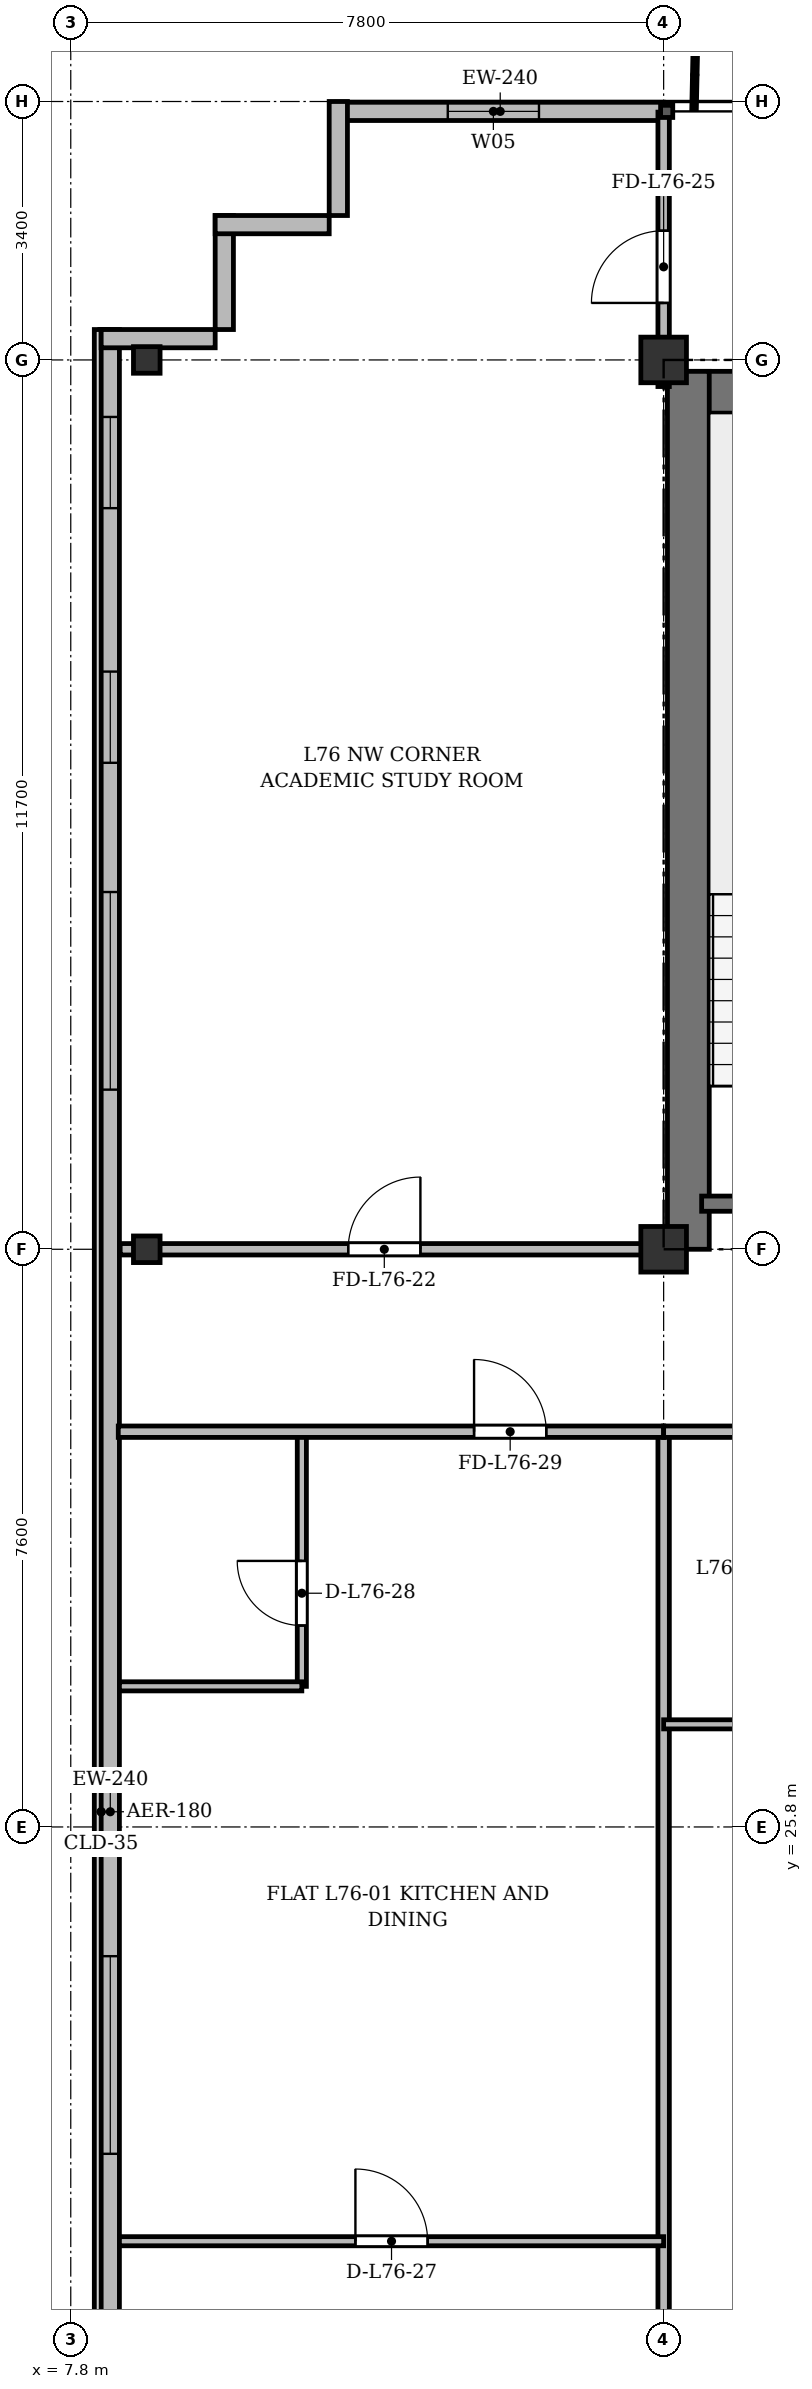
"""IFC4 building model, lengths in metres.
Left out: names, types, materials, properties, quantities, classifications, styles, units other than length and angle.
Written with IfcOpenShell. Run it as: python <this file> out.ifc"""

import sys

from ifc_helpers import new_model, si_unit, direction, frame, frame_2d, origin, origin_2d, place, context, subcontext, project, spatial, rectangle, i_section, extrude, source, transform, mapped, element, fill, save


model = new_model("IFC4")
c1 = context("Model", 3, precision=1e-05, world=origin(), true_north=direction((0.0, 1.0)))
c2 = subcontext(c1, "Body", "Model", "MODEL_VIEW")
j1 = project(units=[si_unit("LENGTHUNIT", "METRE"), si_unit("PLANEANGLEUNIT", "RADIAN")], contexts=[c1])
p1 = place(None, origin())
s1 = spatial("IfcSite", under=j1, at=p1, CompositionType="ELEMENT")
p2 = place(p1, origin())
s2 = spatial("IfcBuilding", under=s1, at=p2, CompositionType="ELEMENT")
p3 = place(p2, frame((0.0, 0.0, 291.9)))
s3 = spatial("IfcBuildingStorey", under=s2, at=p3, CompositionType="ELEMENT", Elevation=291.9)
m1 = source(origin(), c2, "Body", "SweptSolid", [
    extrude(i_section(OverallWidth=0.35, OverallDepth=0.35, WebThickness=0.018, FlangeThickness=0.028, at=origin_2d()), origin(), (0.0, 0.0, 1.0), 3.6),
])
for number, where, z_axis, x_axis in (
    (1, (8.8, 33.4, 0.0), (0.0, 0.0, 1.0), (1.0, 0.0, 0.0)),
    (2, (8.8, 45.1, 0.0), (0.0, 0.0, 1.0), (1.0, 0.0, 0.0)),
):
    element("IfcColumn", number, at=place(p3, frame(where, z_axis=z_axis, x_axis=x_axis)), inside=s3, PredefinedType="COLUMN", context=c2, shape_type="MappedRepresentation", body=[
        mapped(m1, transform((0.0, 0.0, 0.0), x_axis=(1.0, 0.0, 0.0), y_axis=(0.0, 1.0, 0.0), z_axis=(0.0, 0.0, 1.0), scale=1.0)),
    ])
m2 = source(origin(), c2, "Body", "SweptSolid", [
    extrude(rectangle(XDim=0.6, YDim=0.6, at=origin_2d()), origin(), (0.0, 0.0, 1.0), 3.6),
])
for number, where, z_axis, x_axis in (
    (3, (15.6, 33.4, 0.0), (0.0, 0.0, 1.0), (1.0, 0.0, 0.0)),
    (4, (15.6, 45.1, 0.0), (0.0, 0.0, 1.0), (1.0, 0.0, 0.0)),
):
    element("IfcColumn", number, at=place(p3, frame(where, z_axis=z_axis, x_axis=x_axis)), inside=s3, PredefinedType="COLUMN", context=c2, shape_type="MappedRepresentation", body=[
        mapped(m2, transform((0.0, 0.0, 0.0), x_axis=(1.0, 0.0, 0.0), y_axis=(0.0, 1.0, 0.0), z_axis=(0.0, 0.0, 1.0), scale=1.0)),
    ])
p4 = place(p3, frame((11.3, 48.37, 0.0), z_axis=(0.0, 0.0, 1.0), x_axis=(1.0, 0.0, 0.0)))
e5 = element("IfcWall", 5, at=p4, inside=s3, PredefinedType="SOLIDWALL", context=c2, shape_type="SweptSolid", body=[
    extrude(rectangle(XDim=4.3, YDim=0.24, at=frame_2d((2.15, 0.0))), origin(), (0.0, 0.0, 1.0), 3.18),
])
p5 = place(p4, frame((1.46, 0.0, 0.9)))
e6 = element("IfcOpeningElement", 6, at=p5, cuts=e5, PredefinedType="OPENING", context=c2, shape_type="SweptSolid", body=[
    extrude(rectangle(XDim=1.2, YDim=1.65, at=frame_2d((0.6, 0.825))), frame((0.0, 0.13, 0.0), z_axis=(0.0, -1.0, 0.0), x_axis=(1.0, 0.0, 0.0)), (0.0, 0.0, 1.0), 0.26),
])
p6 = place(p3, frame((8.32, 6.5, 0.0), z_axis=(0.0, 0.0, 1.0), x_axis=(0.0, 1.0, 0.0)))
e7 = element("IfcWall", 7, at=p6, inside=s3, PredefinedType="SOLIDWALL", context=c2, shape_type="SweptSolid", body=[
    extrude(rectangle(XDim=39.0, YDim=0.24, at=frame_2d((19.5, 0.0))), origin(), (0.0, 0.0, 1.0), 3.18),
])
p7 = place(p6, frame((1.45, 0.0, 0.92)))
e8 = element("IfcOpeningElement", 8, at=p7, cuts=e7, PredefinedType="OPENING", context=c2, shape_type="SweptSolid", body=[
    extrude(rectangle(XDim=1.2, YDim=1.65, at=frame_2d((0.6, 0.825))), frame((0.0, 0.13, 0.0), z_axis=(0.0, -1.0, 0.0), x_axis=(1.0, 0.0, 0.0)), (0.0, 0.0, 1.0), 0.26),
])
p8 = place(p6, frame((3.6, 0.0, 0.92)))
e9 = element("IfcOpeningElement", 9, at=p8, cuts=e7, PredefinedType="OPENING", context=c2, shape_type="SweptSolid", body=[
    extrude(rectangle(XDim=2.6, YDim=1.9, at=frame_2d((1.3, 0.95))), frame((0.0, 0.13, 0.0), z_axis=(0.0, -1.0, 0.0), x_axis=(1.0, 0.0, 0.0)), (0.0, 0.0, 1.0), 0.26),
])
p9 = place(p6, frame((7.8, 0.0, 0.92)))
e10 = element("IfcOpeningElement", 10, at=p9, cuts=e7, PredefinedType="OPENING", context=c2, shape_type="SweptSolid", body=[
    extrude(rectangle(XDim=2.6, YDim=1.9, at=frame_2d((1.3, 0.95))), frame((0.0, 0.13, 0.0), z_axis=(0.0, -1.0, 0.0), x_axis=(1.0, 0.0, 0.0)), (0.0, 0.0, 1.0), 0.26),
])
p10 = place(p6, frame((15.0, 0.0, 0.92)))
e11 = element("IfcOpeningElement", 11, at=p10, cuts=e7, PredefinedType="OPENING", context=c2, shape_type="SweptSolid", body=[
    extrude(rectangle(XDim=2.6, YDim=1.9, at=frame_2d((1.3, 0.95))), frame((0.0, 0.13, 0.0), z_axis=(0.0, -1.0, 0.0), x_axis=(1.0, 0.0, 0.0)), (0.0, 0.0, 1.0), 0.26),
])
p11 = place(p6, frame((29.0, 0.0, 0.92)))
e12 = element("IfcOpeningElement", 12, at=p11, cuts=e7, PredefinedType="OPENING", context=c2, shape_type="SweptSolid", body=[
    extrude(rectangle(XDim=2.6, YDim=1.9, at=frame_2d((1.3, 0.95))), frame((0.0, 0.13, 0.0), z_axis=(0.0, -1.0, 0.0), x_axis=(1.0, 0.0, 0.0)), (0.0, 0.0, 1.0), 0.26),
])
p12 = place(p6, frame((33.3, 0.0, 0.92)))
e13 = element("IfcOpeningElement", 13, at=p12, cuts=e7, PredefinedType="OPENING", context=c2, shape_type="SweptSolid", body=[
    extrude(rectangle(XDim=1.2, YDim=1.65, at=frame_2d((0.6, 0.825))), frame((0.0, 0.13, 0.0), z_axis=(0.0, -1.0, 0.0), x_axis=(1.0, 0.0, 0.0)), (0.0, 0.0, 1.0), 0.26),
])
p13 = place(p6, frame((36.65, 0.0, 0.92)))
e14 = element("IfcOpeningElement", 14, at=p13, cuts=e7, PredefinedType="OPENING", context=c2, shape_type="SweptSolid", body=[
    extrude(rectangle(XDim=1.2, YDim=1.65, at=frame_2d((0.6, 0.825))), frame((0.0, 0.13, 0.0), z_axis=(0.0, -1.0, 0.0), x_axis=(1.0, 0.0, 0.0)), (0.0, 0.0, 1.0), 0.26),
])
for number, where, z_axis, x_axis in (
    (15, (8.2, 45.38, 0.0), (0.0, 0.0, 1.0), (1.0, 0.0, 0.0)),
    (16, (9.82, 45.5, 0.0), (0.0, 0.0, 1.0), (0.0, 1.0, 0.0)),
    (17, (9.7, 46.88, 0.0), (0.0, 0.0, 1.0), (1.0, 0.0, 0.0)),
    (18, (11.32, 47.0, 0.0), (0.0, 0.0, 1.0), (0.0, 1.0, 0.0)),
):
    element("IfcWall", number, at=place(p3, frame(where, z_axis=z_axis, x_axis=x_axis)), inside=s3, PredefinedType="SOLIDWALL", context=c2, shape_type="SweptSolid", body=[
        extrude(rectangle(XDim=1.5, YDim=0.24, at=frame_2d((0.75, 0.0))), origin(), (0.0, 0.0, 1.0), 3.18),
    ])
p14 = place(p3, frame((15.65, 44.675, 0.0), z_axis=(0.0, 0.0, 1.0), x_axis=(1.0, 0.0, 0.0)))
e19 = element("IfcWall", 19, at=p14, inside=s3, PredefinedType="SHEAR", context=c2, shape_type="SweptSolid", body=[
    extrude(rectangle(XDim=43.1, YDim=0.55, at=frame_2d((21.55, 0.0))), origin(), (0.0, 0.0, 1.0), 3.18),
])
p15 = place(p3, frame((15.925, 33.4, 0.0), z_axis=(0.0, 0.0, 1.0), x_axis=(0.0, 1.0, 0.0)))
e20 = element("IfcWall", 20, at=p15, inside=s3, PredefinedType="SHEAR", context=c2, shape_type="SweptSolid", body=[
    extrude(rectangle(XDim=11.55, YDim=0.55, at=frame_2d((5.775, 0.0))), origin(), (0.0, 0.0, 1.0), 3.18),
])
p16 = place(p3, frame((16.1, 34.0, 0.0), z_axis=(0.0, 0.0, 1.0), x_axis=(1.0, 0.0, 0.0)))
e21 = element("IfcWall", 21, at=p16, inside=s3, PredefinedType="SHEAR", context=c2, shape_type="SweptSolid", body=[
    extrude(rectangle(XDim=3.4, YDim=0.2, at=frame_2d((1.7, 0.0))), origin(), (0.0, 0.0, 1.0), 3.18),
])
p17 = place(p3, frame((8.45, 33.4, 0.0), z_axis=(0.0, 0.0, 1.0), x_axis=(1.0, 0.0, 0.0)))
e22 = element("IfcWall", 22, at=p17, inside=s3, PredefinedType="PARTITIONING", context=c2, shape_type="SweptSolid", body=[
    extrude(rectangle(XDim=7.15, YDim=0.15, at=frame_2d((3.575, 0.0))), origin(), (0.0, 0.0, 1.0), 2.53),
])
p18 = place(p17, frame((3.0, 0.0, 0.0)))
e23 = element("IfcOpeningElement", 23, at=p18, cuts=e22, PredefinedType="OPENING", context=c2, shape_type="SweptSolid", body=[
    extrude(rectangle(XDim=0.95, YDim=2.15, at=frame_2d((0.475, 1.075))), frame((0.0, 0.085, 0.0), z_axis=(0.0, -1.0, 0.0), x_axis=(1.0, 0.0, 0.0)), (0.0, 0.0, 1.0), 0.17),
])
p19 = place(p3, frame((15.6, 44.75, 0.0), z_axis=(0.0, 0.0, 1.0), x_axis=(0.0, 1.0, 0.0)))
e24 = element("IfcWall", 24, at=p19, inside=s3, PredefinedType="PARTITIONING", context=c2, shape_type="SweptSolid", body=[
    extrude(rectangle(XDim=3.61, YDim=0.15, at=frame_2d((1.805, 0.0))), origin(), (0.0, 0.0, 1.0), 2.68),
])
p20 = place(p19, frame((1.1, 0.0, 0.0)))
e25 = element("IfcOpeningElement", 25, at=p20, cuts=e24, PredefinedType="OPENING", context=c2, shape_type="SweptSolid", body=[
    extrude(rectangle(XDim=0.95, YDim=2.15, at=frame_2d((0.475, 1.075))), frame((0.0, 0.085, 0.0), z_axis=(0.0, -1.0, 0.0), x_axis=(1.0, 0.0, 0.0)), (0.0, 0.0, 1.0), 0.17),
])
p21 = place(p3, frame((15.6, 3.725, 0.0), z_axis=(0.0, 0.0, 1.0), x_axis=(0.0, 1.0, 0.0)))
e26 = element("IfcWall", 26, at=p21, inside=s3, PredefinedType="PARTITIONING", context=c2, shape_type="SweptSolid", body=[
    extrude(rectangle(XDim=27.275, YDim=0.15, at=frame_2d((13.637, 0.0))), origin(), (0.0, 0.0, 1.0), 2.53),
])
p22 = place(p3, frame((8.44, 20.35, 0.0), z_axis=(0.0, 0.0, 1.0), x_axis=(1.0, 0.0, 0.0)))
e27 = element("IfcWall", 27, at=p22, inside=s3, PredefinedType="PARTITIONING", context=c2, shape_type="SweptSolid", body=[
    extrude(rectangle(XDim=7.16, YDim=0.12, at=frame_2d((3.58, 0.0))), origin(), (0.0, 0.0, 1.0), 2.68),
])
p23 = place(p22, frame((3.105, 0.0, 0.0)))
e28 = element("IfcOpeningElement", 28, at=p23, cuts=e27, PredefinedType="OPENING", context=c2, shape_type="SweptSolid", body=[
    extrude(rectangle(XDim=0.95, YDim=2.15, at=frame_2d((0.475, 1.075))), frame((0.0, 0.07, 0.0), z_axis=(0.0, -1.0, 0.0), x_axis=(1.0, 0.0, 0.0)), (0.0, 0.0, 1.0), 0.14),
])
p24 = place(p3, frame((10.84, 27.65, 0.0), z_axis=(0.0, 0.0, 1.0), x_axis=(0.0, 1.0, 0.0)))
e29 = element("IfcWall", 29, at=p24, inside=s3, PredefinedType="PARTITIONING", context=c2, shape_type="SweptSolid", body=[
    extrude(rectangle(XDim=3.35, YDim=0.12, at=frame_2d((1.675, 0.0))), origin(), (0.0, 0.0, 1.0), 3.18),
])
p25 = place(p24, frame((0.8, 0.0, 0.0)))
e30 = element("IfcOpeningElement", 30, at=p25, cuts=e29, PredefinedType="OPENING", context=c2, shape_type="SweptSolid", body=[
    extrude(rectangle(XDim=0.85, YDim=2.1, at=frame_2d((0.425, 1.05))), frame((0.0, 0.07, 0.0), z_axis=(0.0, -1.0, 0.0), x_axis=(1.0, 0.0, 0.0)), (0.0, 0.0, 1.0), 0.14),
])
p26 = place(p3, frame((8.44, 27.65, 0.0), z_axis=(0.0, 0.0, 1.0), x_axis=(1.0, 0.0, 0.0)))
e31 = element("IfcWall", 31, at=p26, inside=s3, PredefinedType="PARTITIONING", context=c2, shape_type="SweptSolid", body=[
    extrude(rectangle(XDim=2.4, YDim=0.12, at=frame_2d((1.2, 0.0))), origin(), (0.0, 0.0, 1.0), 2.68),
])
p27 = place(p3, frame((8.425, 31.0, 0.0), z_axis=(0.0, 0.0, 1.0), x_axis=(1.0, 0.0, 0.0)))
e32 = element("IfcWall", 32, at=p27, inside=s3, PredefinedType="PARTITIONING", context=c2, shape_type="SweptSolid", body=[
    extrude(rectangle(XDim=7.175, YDim=0.15, at=frame_2d((3.587, 0.0))), origin(), (0.0, 0.0, 1.0), 2.53),
])
p28 = place(p27, frame((4.681, 0.0, 0.0)))
e33 = element("IfcOpeningElement", 33, at=p28, cuts=e32, PredefinedType="OPENING", context=c2, shape_type="SweptSolid", body=[
    extrude(rectangle(XDim=0.95, YDim=2.15, at=frame_2d((0.475, 1.075))), frame((0.0, 0.085, 0.0), z_axis=(0.0, -1.0, 0.0), x_axis=(1.0, 0.0, 0.0)), (0.0, 0.0, 1.0), 0.17),
])
p29 = place(p3, frame((15.6, 31.0, 0.0), z_axis=(0.0, 0.0, 1.0), x_axis=(1.0, 0.0, 0.0)))
e34 = element("IfcWall", 34, at=p29, inside=s3, PredefinedType="PARTITIONING", context=c2, shape_type="SweptSolid", body=[
    extrude(rectangle(XDim=7.8, YDim=0.15, at=frame_2d((3.9, 0.0))), origin(), (0.0, 0.0, 1.0), 2.68),
])
p30 = place(p29, frame((3.333, 0.0, 0.0)))
e35 = element("IfcOpeningElement", 35, at=p30, cuts=e34, PredefinedType="OPENING", context=c2, shape_type="SweptSolid", body=[
    extrude(rectangle(XDim=0.95, YDim=2.15, at=frame_2d((0.475, 1.075))), frame((0.0, 0.085, 0.0), z_axis=(0.0, -1.0, 0.0), x_axis=(1.0, 0.0, 0.0)), (0.0, 0.0, 1.0), 0.17),
])
p31 = place(p3, frame((15.6, 27.15, 0.0), z_axis=(0.0, 0.0, 1.0), x_axis=(1.0, 0.0, 0.0)))
e36 = element("IfcWall", 36, at=p31, inside=s3, PredefinedType="PARTITIONING", context=c2, shape_type="SweptSolid", body=[
    extrude(rectangle(XDim=7.8, YDim=0.12, at=frame_2d((3.9, 0.0))), origin(), (0.0, 0.0, 1.0), 2.68),
])
p32 = place(p31, frame((3.333, 0.0, 0.0)))
e37 = element("IfcOpeningElement", 37, at=p32, cuts=e36, PredefinedType="OPENING", context=c2, shape_type="SweptSolid", body=[
    extrude(rectangle(XDim=0.95, YDim=2.15, at=frame_2d((0.475, 1.075))), frame((0.0, 0.07, 0.0), z_axis=(0.0, -1.0, 0.0), x_axis=(1.0, 0.0, 0.0)), (0.0, 0.0, 1.0), 0.14),
])
m3 = source(origin(), c2, "Body", "SweptSolid", [
    extrude(rectangle(XDim=1.2, YDim=1.65, at=frame_2d((0.6, 0.825))), frame((0.0, 0.03, 0.0), z_axis=(0.0, -1.0, 0.0), x_axis=(1.0, 0.0, 0.0)), (0.0, 0.0, 1.0), 0.06),
])
p33 = place(p5, origin())
e38 = element("IfcWindow", 38, at=p33, inside=s3, PartitioningType="SINGLE_PANEL", PredefinedType="WINDOW", context=c2, shape_type="MappedRepresentation", body=[
    mapped(m3, transform((0.0, 0.0, 0.0), x_axis=(1.0, 0.0, 0.0), y_axis=(0.0, 1.0, 0.0), z_axis=(0.0, 0.0, 1.0), scale=1.0)),
])
fill(e6, e38)
m4 = source(origin(), c2, "Body", "SweptSolid", [
    extrude(rectangle(XDim=2.6, YDim=1.9, at=frame_2d((1.3, 0.95))), frame((0.0, 0.03, 0.0), z_axis=(0.0, -1.0, 0.0), x_axis=(1.0, 0.0, 0.0)), (0.0, 0.0, 1.0), 0.06),
])
p34 = place(p10, origin())
e39 = element("IfcWindow", 39, at=p34, inside=s3, PartitioningType="SINGLE_PANEL", PredefinedType="WINDOW", context=c2, shape_type="MappedRepresentation", body=[
    mapped(m4, transform((0.0, 0.0, 0.0), x_axis=(1.0, 0.0, 0.0), y_axis=(0.0, 1.0, 0.0), z_axis=(0.0, 0.0, 1.0), scale=1.0)),
])
fill(e11, e39)
p35 = place(p11, origin())
e40 = element("IfcWindow", 40, at=p35, inside=s3, PartitioningType="SINGLE_PANEL", PredefinedType="WINDOW", context=c2, shape_type="MappedRepresentation", body=[
    mapped(m4, transform((0.0, 0.0, 0.0), x_axis=(1.0, 0.0, 0.0), y_axis=(0.0, 1.0, 0.0), z_axis=(0.0, 0.0, 1.0), scale=1.0)),
])
fill(e12, e40)
p36 = place(p12, origin())
e41 = element("IfcWindow", 41, at=p36, inside=s3, PartitioningType="SINGLE_PANEL", PredefinedType="WINDOW", context=c2, shape_type="MappedRepresentation", body=[
    mapped(m3, transform((0.0, 0.0, 0.0), x_axis=(1.0, 0.0, 0.0), y_axis=(0.0, 1.0, 0.0), z_axis=(0.0, 0.0, 1.0), scale=1.0)),
])
fill(e13, e41)
p37 = place(p13, origin())
e42 = element("IfcWindow", 42, at=p37, inside=s3, PartitioningType="SINGLE_PANEL", PredefinedType="WINDOW", context=c2, shape_type="MappedRepresentation", body=[
    mapped(m3, transform((0.0, 0.0, 0.0), x_axis=(1.0, 0.0, 0.0), y_axis=(0.0, 1.0, 0.0), z_axis=(0.0, 0.0, 1.0), scale=1.0)),
])
fill(e14, e42)
m5 = source(origin(), c2, "Body", "SweptSolid", [
    extrude(rectangle(XDim=0.95, YDim=2.15, at=frame_2d((0.475, 1.075))), frame((0.0, 0.025, 0.0), z_axis=(0.0, -1.0, 0.0), x_axis=(1.0, 0.0, 0.0)), (0.0, 0.0, 1.0), 0.05),
])
p38 = place(p18, origin())
e43 = element("IfcDoor", 43, at=p38, inside=s3, OperationType="SINGLE_SWING_RIGHT", PredefinedType="DOOR", context=c2, shape_type="MappedRepresentation", body=[
    mapped(m5, transform((0.0, 0.0, 0.0), x_axis=(1.0, 0.0, 0.0), y_axis=(0.0, 1.0, 0.0), z_axis=(0.0, 0.0, 1.0), scale=1.0)),
])
fill(e23, e43)
p39 = place(p20, origin())
e44 = element("IfcDoor", 44, at=p39, inside=s3, OperationType="SINGLE_SWING_LEFT", PredefinedType="DOOR", context=c2, shape_type="MappedRepresentation", body=[
    mapped(m5, transform((0.0, 0.0, 0.0), x_axis=(1.0, 0.0, 0.0), y_axis=(0.0, 1.0, 0.0), z_axis=(0.0, 0.0, 1.0), scale=1.0)),
])
fill(e25, e44)
p40 = place(p23, origin())
e45 = element("IfcDoor", 45, at=p40, inside=s3, OperationType="SINGLE_SWING_LEFT", PredefinedType="DOOR", context=c2, shape_type="MappedRepresentation", body=[
    mapped(m5, transform((0.0, 0.0, 0.0), x_axis=(1.0, 0.0, 0.0), y_axis=(0.0, 1.0, 0.0), z_axis=(0.0, 0.0, 1.0), scale=1.0)),
])
fill(e28, e45)
m6 = source(origin(), c2, "Body", "SweptSolid", [
    extrude(rectangle(XDim=0.85, YDim=2.1, at=frame_2d((0.425, 1.05))), frame((0.0, 0.025, 0.0), z_axis=(0.0, -1.0, 0.0), x_axis=(1.0, 0.0, 0.0)), (0.0, 0.0, 1.0), 0.05),
])
p41 = place(p25, origin())
e46 = element("IfcDoor", 46, at=p41, inside=s3, OperationType="SINGLE_SWING_RIGHT", PredefinedType="DOOR", context=c2, shape_type="MappedRepresentation", body=[
    mapped(m6, transform((0.0, 0.0, 0.0), x_axis=(1.0, 0.0, 0.0), y_axis=(0.0, 1.0, 0.0), z_axis=(0.0, 0.0, 1.0), scale=1.0)),
])
fill(e30, e46)
p42 = place(p28, origin())
e47 = element("IfcDoor", 47, at=p42, inside=s3, OperationType="SINGLE_SWING_LEFT", PredefinedType="DOOR", context=c2, shape_type="MappedRepresentation", body=[
    mapped(m5, transform((0.0, 0.0, 0.0), x_axis=(1.0, 0.0, 0.0), y_axis=(0.0, 1.0, 0.0), z_axis=(0.0, 0.0, 1.0), scale=1.0)),
])
fill(e33, e47)
save(model, sys.argv[1])
